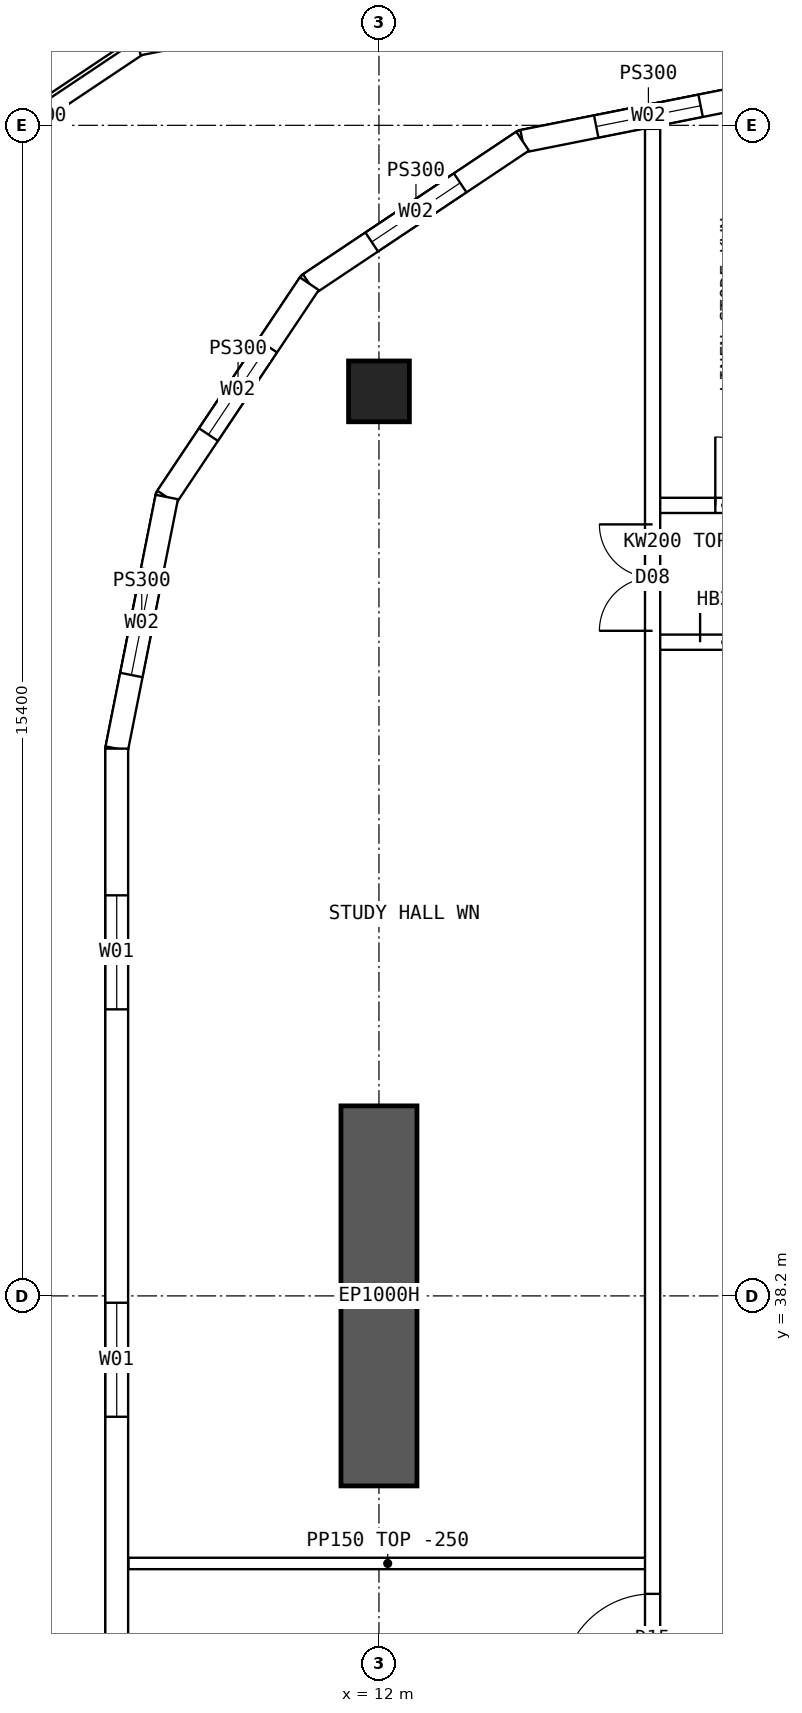
"""IFC4 building model, lengths in metres.
Left out: names, types, materials, properties, quantities, classifications, styles, units other than length and angle.
Written with IfcOpenShell. Run it as: python <this file> out.ifc"""

import sys

from ifc_helpers import new_model, si_unit, direction, frame, frame_2d, origin, origin_2d, place, context, subcontext, project, spatial, polyline, rectangle, hollow_rectangle, outline, extrude, element, fill, save


model = new_model("IFC4")
c1 = context("Model", 3, precision=1e-05, world=origin(), true_north=direction((0.0, 1.0)))
c2 = subcontext(c1, "Body", "Model", "MODEL_VIEW")
j1 = project(units=[si_unit("LENGTHUNIT", "METRE"), si_unit("PLANEANGLEUNIT", "RADIAN")], contexts=[c1])
p1 = place(None, origin())
s1 = spatial("IfcSite", under=j1, at=p1, CompositionType="ELEMENT")
p2 = place(p1, origin())
s2 = spatial("IfcBuilding", under=s1, at=p2, CompositionType="ELEMENT")
p3 = place(p2, frame((0.0, 0.0, 140.35)))
s3 = spatial("IfcBuildingStorey", under=s2, at=p3, CompositionType="ELEMENT", Elevation=140.35)
p4 = place(p3, frame((12.0, 50.1, 0.0), z_axis=(0.0, 0.0, 1.0), x_axis=(1.0, 0.0, 0.0)))
e1 = element("IfcColumn", 1, at=p4, inside=s3, PredefinedType="COLUMN", context=c2, shape_type="SweptSolid", body=[
    extrude(hollow_rectangle(XDim=0.8, YDim=0.8, WallThickness=0.08, at=origin_2d()), origin(), (0.0, 0.0, 1.0), 4.5),
])
p5 = place(p3, frame((12.0, 35.7, 0.0), z_axis=(0.0, 0.0, 1.0), x_axis=(0.0, 1.0, 0.0)))
e2 = element("IfcWall", 2, at=p5, inside=s3, PredefinedType="SHEAR", context=c2, shape_type="SweptSolid", body=[
    extrude(rectangle(XDim=5.0, YDim=1.0, at=frame_2d((2.5, 0.0))), origin(), (0.0, 0.0, 1.0), 4.5),
])
p6 = place(p3, frame((8.55, 45.4, 0.0), z_axis=(0.0, 0.0, 1.0), x_axis=(0.0, -1.0, 0.0)))
e3 = element("IfcWall", 3, at=p6, inside=s3, PredefinedType="SOLIDWALL", context=c2, shape_type="SweptSolid", body=[
    extrude(outline(polyline([(-0.015, -0.15), (26.815, -0.15), (26.785, 0.15), (0.015, 0.15), (-0.015, -0.15)])), origin(), (0.0, 0.0, 1.0), 4.25),
])
p7 = place(p6, frame((1.93, 0.0, 0.9)))
e4 = element("IfcOpeningElement", 4, at=p7, cuts=e3, PredefinedType="OPENING", context=c2, shape_type="SweptSolid", body=[
    extrude(rectangle(XDim=1.5, YDim=2.0, at=frame_2d((0.75, 1.0))), frame((0.0, 0.16, 0.0), z_axis=(0.0, -1.0, 0.0), x_axis=(1.0, 0.0, 0.0)), (0.0, 0.0, 1.0), 0.32),
])
p8 = place(p6, frame((7.29, 0.0, 0.9)))
e5 = element("IfcOpeningElement", 5, at=p8, cuts=e3, PredefinedType="OPENING", context=c2, shape_type="SweptSolid", body=[
    extrude(rectangle(XDim=1.5, YDim=2.0, at=frame_2d((0.75, 1.0))), frame((0.0, 0.16, 0.0), z_axis=(0.0, -1.0, 0.0), x_axis=(1.0, 0.0, 0.0)), (0.0, 0.0, 1.0), 0.32),
])
p9 = place(p6, frame((12.65, 0.0, 0.9)))
e6 = element("IfcOpeningElement", 6, at=p9, cuts=e3, PredefinedType="OPENING", context=c2, shape_type="SweptSolid", body=[
    extrude(rectangle(XDim=1.5, YDim=2.0, at=frame_2d((0.75, 1.0))), frame((0.0, 0.16, 0.0), z_axis=(0.0, -1.0, 0.0), x_axis=(1.0, 0.0, 0.0)), (0.0, 0.0, 1.0), 0.32),
])
p10 = place(p6, frame((18.01, 0.0, 0.9)))
e7 = element("IfcOpeningElement", 7, at=p10, cuts=e3, PredefinedType="OPENING", context=c2, shape_type="SweptSolid", body=[
    extrude(rectangle(XDim=1.5, YDim=2.0, at=frame_2d((0.75, 1.0))), frame((0.0, 0.16, 0.0), z_axis=(0.0, -1.0, 0.0), x_axis=(1.0, 0.0, 0.0)), (0.0, 0.0, 1.0), 0.32),
])
p11 = place(p6, frame((23.62, 0.0, 0.0)))
e8 = element("IfcOpeningElement", 8, at=p11, cuts=e3, PredefinedType="OPENING", context=c2, shape_type="SweptSolid", body=[
    extrude(rectangle(XDim=1.0, YDim=2.1, at=frame_2d((0.5, 1.05))), frame((0.0, 0.16, 0.0), z_axis=(0.0, -1.0, 0.0), x_axis=(1.0, 0.0, 0.0)), (0.0, 0.0, 1.0), 0.32),
])
p12 = place(p3, frame((17.2, 54.05, 0.0), z_axis=(0.0, 0.0, 1.0), x_axis=(-0.98078325777, -0.195100490205, 0.0)))
e9 = element("IfcWall", 9, at=p12, inside=s3, PredefinedType="SOLIDWALL", context=c2, shape_type="SweptSolid", body=[
    extrude(outline(polyline([(-0.03, -0.15), (3.405, -0.15), (3.345, 0.15), (0.03, 0.15), (-0.03, -0.15)])), origin(), (0.0, 0.0, 1.0), 4.25),
])
p13 = place(p12, frame((0.988, 0.0, 0.9)))
e10 = element("IfcOpeningElement", 10, at=p13, cuts=e9, PredefinedType="OPENING", context=c2, shape_type="SweptSolid", body=[
    extrude(rectangle(XDim=1.4, YDim=1.8, at=frame_2d((0.7, 0.9))), frame((0.0, 0.16, 0.0), z_axis=(0.0, -1.0, 0.0), x_axis=(1.0, 0.0, 0.0)), (0.0, 0.0, 1.0), 0.32),
])
p14 = place(p3, frame((13.89, 53.392, 0.0), z_axis=(0.0, 0.0, 1.0), x_axis=(-0.831493450887, -0.555534554399, 0.0)))
e11 = element("IfcWall", 11, at=p14, inside=s3, PredefinedType="SOLIDWALL", context=c2, shape_type="SweptSolid", body=[
    extrude(outline(polyline([(-0.03, -0.15), (3.405, -0.15), (3.345, 0.15), (0.03, 0.15), (-0.03, -0.15)])), origin(), (0.0, 0.0, 1.0), 4.25),
])
p15 = place(p14, frame((0.988, 0.0, 0.9)))
e12 = element("IfcOpeningElement", 12, at=p15, cuts=e11, PredefinedType="OPENING", context=c2, shape_type="SweptSolid", body=[
    extrude(rectangle(XDim=1.4, YDim=1.8, at=frame_2d((0.7, 0.9))), frame((0.0, 0.16, 0.0), z_axis=(0.0, -1.0, 0.0), x_axis=(1.0, 0.0, 0.0)), (0.0, 0.0, 1.0), 0.32),
])
p16 = place(p3, frame((11.083, 51.517, 0.0), z_axis=(0.0, 0.0, 1.0), x_axis=(-0.555534554399, -0.831493450887, 0.0)))
e13 = element("IfcWall", 13, at=p16, inside=s3, PredefinedType="SOLIDWALL", context=c2, shape_type="SweptSolid", body=[
    extrude(outline(polyline([(-0.03, -0.15), (3.405, -0.15), (3.345, 0.15), (0.03, 0.15), (-0.03, -0.15)])), origin(), (0.0, 0.0, 1.0), 4.25),
])
p17 = place(p16, frame((0.988, 0.0, 0.9)))
e14 = element("IfcOpeningElement", 14, at=p17, cuts=e13, PredefinedType="OPENING", context=c2, shape_type="SweptSolid", body=[
    extrude(rectangle(XDim=1.4, YDim=1.8, at=frame_2d((0.7, 0.9))), frame((0.0, 0.16, 0.0), z_axis=(0.0, -1.0, 0.0), x_axis=(1.0, 0.0, 0.0)), (0.0, 0.0, 1.0), 0.32),
])
p18 = place(p3, frame((9.208, 48.71, 0.0), z_axis=(0.0, 0.0, 1.0), x_axis=(-0.19508664885, -0.980786011034, 0.0)))
e15 = element("IfcWall", 15, at=p18, inside=s3, PredefinedType="SOLIDWALL", context=c2, shape_type="SweptSolid", body=[
    extrude(outline(polyline([(-0.03, -0.15), (3.39, -0.15), (3.36, 0.15), (0.03, 0.15), (-0.03, -0.15)])), origin(), (0.0, 0.0, 1.0), 4.25),
])
p19 = place(p18, frame((0.988, 0.0, 0.9)))
e16 = element("IfcOpeningElement", 16, at=p19, cuts=e15, PredefinedType="OPENING", context=c2, shape_type="SweptSolid", body=[
    extrude(rectangle(XDim=1.4, YDim=1.8, at=frame_2d((0.7, 0.9))), frame((0.0, 0.16, 0.0), z_axis=(0.0, -1.0, 0.0), x_axis=(1.0, 0.0, 0.0)), (0.0, 0.0, 1.0), 0.32),
])
p20 = place(p3, frame((6.168, 52.832, 0.0), z_axis=(0.0, 0.0, 1.0), x_axis=(0.831454530953, 0.555592803191, 0.0)))
e17 = element("IfcWall", 17, at=p20, inside=s3, PredefinedType="PARAPET", context=c2, shape_type="SweptSolid", body=[
    extrude(rectangle(XDim=3.218, YDim=0.2, at=frame_2d((1.609, 0.0))), origin(), (0.0, 0.0, 1.0), 1.1),
])
p21 = place(p3, frame((8.844, 54.619, 0.0), z_axis=(0.0, 0.0, 1.0), x_axis=(0.980792126237, 0.195055902531, 0.0)))
e18 = element("IfcWall", 18, at=p21, inside=s3, PredefinedType="PARAPET", context=c2, shape_type="SweptSolid", body=[
    extrude(rectangle(XDim=3.233, YDim=0.2, at=frame_2d((1.616, 0.0))), origin(), (0.0, 0.0, 1.0), 1.1),
])
p22 = place(p3, frame((15.6, 48.6, 0.0), z_axis=(0.0, 0.0, 1.0), x_axis=(1.0, 0.0, 0.0)))
e19 = element("IfcWall", 19, at=p22, inside=s3, PredefinedType="SOLIDWALL", context=c2, shape_type="SweptSolid", body=[
    extrude(rectangle(XDim=1.925, YDim=0.2, at=frame_2d((0.962, 0.0))), origin(), (0.0, 0.0, 1.0), 4.25),
])
p23 = place(p22, frame((0.825, 0.0, 0.0)))
e20 = element("IfcOpeningElement", 20, at=p23, cuts=e19, PredefinedType="OPENING", context=c2, shape_type="SweptSolid", body=[
    extrude(rectangle(XDim=0.9, YDim=2.1, at=frame_2d((0.45, 1.05))), frame((0.0, 0.11, 0.0), z_axis=(0.0, -1.0, 0.0), x_axis=(1.0, 0.0, 0.0)), (0.0, 0.0, 1.0), 0.22),
])
p24 = place(p3, frame((15.6, 46.8, 0.0), z_axis=(0.0, 0.0, 1.0), x_axis=(1.0, 0.0, 0.0)))
e21 = element("IfcWall", 21, at=p24, inside=s3, PredefinedType="SOLIDWALL", context=c2, shape_type="SweptSolid", body=[
    extrude(rectangle(XDim=1.925, YDim=0.2, at=frame_2d((0.962, 0.0))), origin(), (0.0, 0.0, 1.0), 4.25),
])
p25 = place(p24, frame((0.625, 0.0, 0.0)))
e22 = element("IfcOpeningElement", 22, at=p25, cuts=e21, PredefinedType="OPENING", context=c2, shape_type="SweptSolid", body=[
    extrude(rectangle(XDim=1.2, YDim=2.1, at=frame_2d((0.6, 1.05))), frame((0.0, 0.11, 0.0), z_axis=(0.0, -1.0, 0.0), x_axis=(1.0, 0.0, 0.0)), (0.0, 0.0, 1.0), 0.22),
])
p26 = place(p3, frame((15.6, 10.446, 0.0), z_axis=(0.0, 0.0, 1.0), x_axis=(0.0, 1.0, 0.0)))
e23 = element("IfcWall", 23, at=p26, inside=s3, PredefinedType="SOLIDWALL", context=c2, shape_type="SweptSolid", body=[
    extrude(rectangle(XDim=43.107, YDim=0.2, at=frame_2d((21.554, 0.0))), origin(), (0.0, 0.0, 1.0), 4.25),
])
p27 = place(p26, frame((13.914, 0.0, 0.0)))
e24 = element("IfcOpeningElement", 24, at=p27, cuts=e23, PredefinedType="OPENING", context=c2, shape_type="SweptSolid", body=[
    extrude(rectangle(XDim=1.2, YDim=2.1, at=frame_2d((0.6, 1.05))), frame((0.0, 0.11, 0.0), z_axis=(0.0, -1.0, 0.0), x_axis=(1.0, 0.0, 0.0)), (0.0, 0.0, 1.0), 0.22),
])
p28 = place(p26, frame((22.634, 0.0, 0.0)))
e25 = element("IfcOpeningElement", 25, at=p28, cuts=e23, PredefinedType="OPENING", context=c2, shape_type="SweptSolid", body=[
    extrude(rectangle(XDim=1.2, YDim=2.1, at=frame_2d((0.6, 1.05))), frame((0.0, 0.11, 0.0), z_axis=(0.0, -1.0, 0.0), x_axis=(1.0, 0.0, 0.0)), (0.0, 0.0, 1.0), 0.22),
])
p29 = place(p26, frame((5.104, 0.0, 0.0)))
e26 = element("IfcOpeningElement", 26, at=p29, cuts=e23, PredefinedType="OPENING", context=c2, shape_type="SweptSolid", body=[
    extrude(rectangle(XDim=1.4, YDim=2.1, at=frame_2d((0.7, 1.05))), frame((0.0, 0.11, 0.0), z_axis=(0.0, -1.0, 0.0), x_axis=(1.0, 0.0, 0.0)), (0.0, 0.0, 1.0), 0.22),
])
p30 = place(p26, frame((36.504, 0.0, 0.0)))
e27 = element("IfcOpeningElement", 27, at=p30, cuts=e23, PredefinedType="OPENING", context=c2, shape_type="SweptSolid", body=[
    extrude(rectangle(XDim=1.4, YDim=2.1, at=frame_2d((0.7, 1.05))), frame((0.0, 0.11, 0.0), z_axis=(0.0, -1.0, 0.0), x_axis=(1.0, 0.0, 0.0)), (0.0, 0.0, 1.0), 0.22),
])
p31 = place(p3, frame((8.705, 34.68, 0.0), z_axis=(0.0, 0.0, 1.0), x_axis=(1.0, 0.0, 0.0)))
e28 = element("IfcWall", 28, at=p31, inside=s3, PredefinedType="PARTITIONING", context=c2, shape_type="SweptSolid", body=[
    extrude(outline(polyline([(0.0, 0.0), (6.82, 0.0), (6.82, 4.25), (3.597, 4.25), (3.595, 3.8), (2.997, 3.8), (2.995, 4.25), (0.0, 4.25), (0.0, 0.0)])), frame((0.0, 0.075, 0.0), z_axis=(0.0, -1.0, 0.0), x_axis=(1.0, 0.0, 0.0)), (0.0, 0.0, 1.0), 0.15),
])
p32 = place(p7, origin())
e29 = element("IfcWindow", 29, at=p32, inside=s3, PartitioningType="SINGLE_PANEL", PredefinedType="WINDOW", context=c2, shape_type="SweptSolid", body=[
    extrude(rectangle(XDim=1.5, YDim=2.0, at=frame_2d((0.75, 1.0))), frame((0.0, 0.03, 0.0), z_axis=(0.0, -1.0, 0.0), x_axis=(1.0, 0.0, 0.0)), (0.0, 0.0, 1.0), 0.06),
])
fill(e4, e29)
p33 = place(p8, origin())
e30 = element("IfcWindow", 30, at=p33, inside=s3, PartitioningType="SINGLE_PANEL", PredefinedType="WINDOW", context=c2, shape_type="SweptSolid", body=[
    extrude(rectangle(XDim=1.5, YDim=2.0, at=frame_2d((0.75, 1.0))), frame((0.0, 0.03, 0.0), z_axis=(0.0, -1.0, 0.0), x_axis=(1.0, 0.0, 0.0)), (0.0, 0.0, 1.0), 0.06),
])
fill(e5, e30)
p34 = place(p13, origin())
e31 = element("IfcWindow", 31, at=p34, inside=s3, PartitioningType="SINGLE_PANEL", PredefinedType="WINDOW", context=c2, shape_type="SweptSolid", body=[
    extrude(rectangle(XDim=1.4, YDim=1.8, at=frame_2d((0.7, 0.9))), frame((0.0, 0.03, 0.0), z_axis=(0.0, -1.0, 0.0), x_axis=(1.0, 0.0, 0.0)), (0.0, 0.0, 1.0), 0.06),
])
fill(e10, e31)
p35 = place(p15, origin())
e32 = element("IfcWindow", 32, at=p35, inside=s3, PartitioningType="SINGLE_PANEL", PredefinedType="WINDOW", context=c2, shape_type="SweptSolid", body=[
    extrude(rectangle(XDim=1.4, YDim=1.8, at=frame_2d((0.7, 0.9))), frame((0.0, 0.03, 0.0), z_axis=(0.0, -1.0, 0.0), x_axis=(1.0, 0.0, 0.0)), (0.0, 0.0, 1.0), 0.06),
])
fill(e12, e32)
p36 = place(p17, origin())
e33 = element("IfcWindow", 33, at=p36, inside=s3, PartitioningType="SINGLE_PANEL", PredefinedType="WINDOW", context=c2, shape_type="SweptSolid", body=[
    extrude(rectangle(XDim=1.4, YDim=1.8, at=frame_2d((0.7, 0.9))), frame((0.0, 0.03, 0.0), z_axis=(0.0, -1.0, 0.0), x_axis=(1.0, 0.0, 0.0)), (0.0, 0.0, 1.0), 0.06),
])
fill(e14, e33)
p37 = place(p19, origin())
e34 = element("IfcWindow", 34, at=p37, inside=s3, PartitioningType="SINGLE_PANEL", PredefinedType="WINDOW", context=c2, shape_type="SweptSolid", body=[
    extrude(rectangle(XDim=1.4, YDim=1.8, at=frame_2d((0.7, 0.9))), frame((0.0, 0.03, 0.0), z_axis=(0.0, -1.0, 0.0), x_axis=(1.0, 0.0, 0.0)), (0.0, 0.0, 1.0), 0.06),
])
fill(e16, e34)
p38 = place(p25, origin())
e35 = element("IfcDoor", 35, at=p38, inside=s3, OperationType="DOUBLE_DOOR_SINGLE_SWING", PredefinedType="DOOR", context=c2, shape_type="SweptSolid", body=[
    extrude(rectangle(XDim=1.2, YDim=2.1, at=frame_2d((0.6, 1.05))), frame((0.0, 0.025, 0.0), z_axis=(0.0, -1.0, 0.0), x_axis=(1.0, 0.0, 0.0)), (0.0, 0.0, 1.0), 0.05),
])
fill(e22, e35)
p39 = place(p28, origin())
e36 = element("IfcDoor", 36, at=p39, inside=s3, OperationType="SINGLE_SWING_LEFT", PredefinedType="DOOR", context=c2, shape_type="SweptSolid", body=[
    extrude(rectangle(XDim=1.2, YDim=2.1, at=frame_2d((0.6, 1.05))), frame((0.0, 0.025, 0.0), z_axis=(0.0, -1.0, 0.0), x_axis=(1.0, 0.0, 0.0)), (0.0, 0.0, 1.0), 0.05),
])
fill(e25, e36)
p40 = place(p30, origin())
e37 = element("IfcDoor", 37, at=p40, inside=s3, OperationType="DOUBLE_DOOR_SINGLE_SWING", PredefinedType="DOOR", context=c2, shape_type="SweptSolid", body=[
    extrude(rectangle(XDim=1.4, YDim=2.1, at=frame_2d((0.7, 1.05))), frame((0.0, 0.025, 0.0), z_axis=(0.0, -1.0, 0.0), x_axis=(1.0, 0.0, 0.0)), (0.0, 0.0, 1.0), 0.05),
])
fill(e27, e37)
p41 = place(p23, origin())
e38 = element("IfcDoor", 38, at=p41, inside=s3, OperationType="SINGLE_SWING_LEFT", PredefinedType="DOOR", context=c2, shape_type="SweptSolid", body=[
    extrude(rectangle(XDim=0.9, YDim=2.1, at=frame_2d((0.45, 1.05))), frame((0.0, 0.025, 0.0), z_axis=(0.0, -1.0, 0.0), x_axis=(1.0, 0.0, 0.0)), (0.0, 0.0, 1.0), 0.05),
])
fill(e20, e38)
save(model, sys.argv[1])
